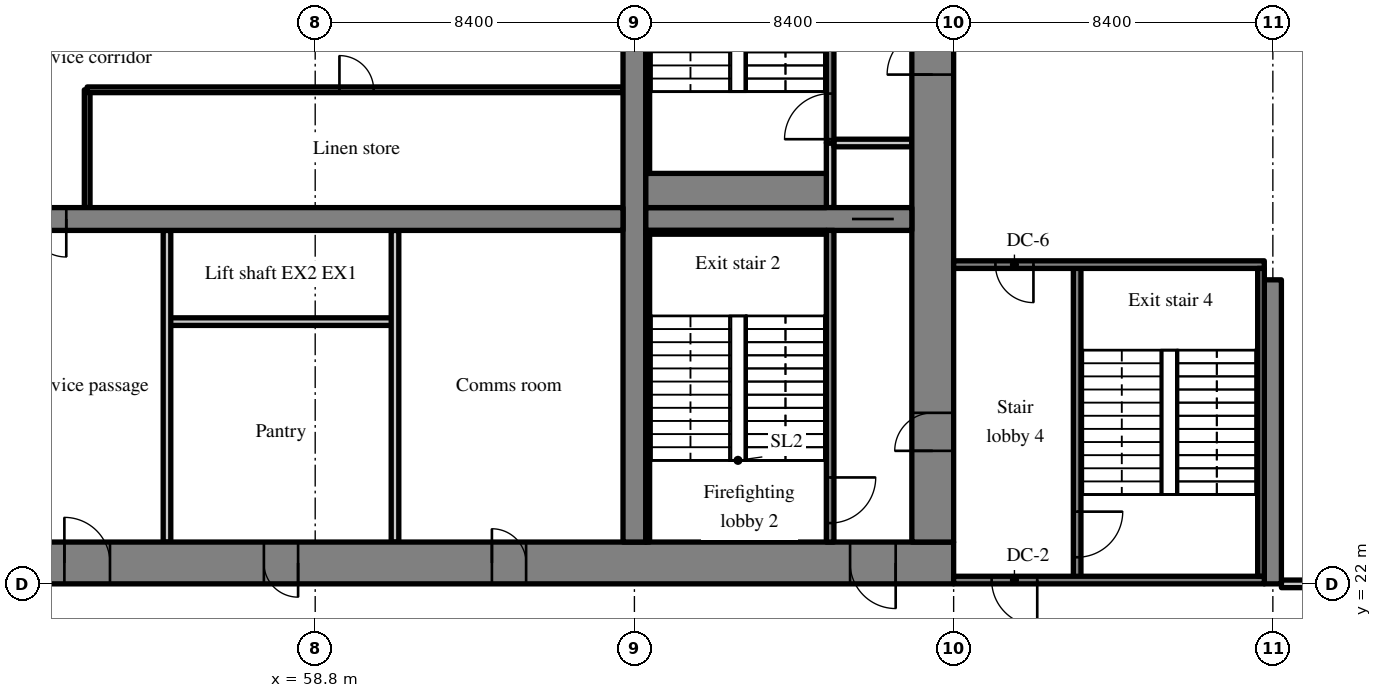
"""IFC4 building model, lengths in metres.
Left out: names, types, materials, properties, quantities, classifications, styles, units other than length and angle.
Written with IfcOpenShell. Run it as: python <this file> out.ifc"""

import sys

from ifc_helpers import new_model, si_unit, direction, frame, frame_2d, origin, place, context, subcontext, project, spatial, rectangle, extrude, source, transform, mapped, element, fill, save


model = new_model("IFC4")
c1 = context("Model", 3, precision=1e-05, world=origin(), true_north=direction((0.0, 1.0)))
c2 = subcontext(c1, "Body", "Model", "MODEL_VIEW")
j1 = project(units=[si_unit("LENGTHUNIT", "METRE"), si_unit("PLANEANGLEUNIT", "RADIAN")], contexts=[c1])
p1 = place(None, origin())
s1 = spatial("IfcSite", under=j1, at=p1, CompositionType="ELEMENT")
p2 = place(p1, origin())
s2 = spatial("IfcBuilding", under=s1, at=p2, CompositionType="ELEMENT")
p3 = place(p2, frame((0.0, 0.0, 27.8)))
s3 = spatial("IfcBuildingStorey", under=s2, at=p3, CompositionType="ELEMENT", Elevation=27.8)
m1 = source(origin(), c2, "Body", "SweptSolid", [
    extrude(rectangle(XDim=50.4, YDim=1.1, at=frame_2d((25.2, 0.0))), origin(), (0.0, 0.0, 1.0), 3.52),
])
p4 = place(p3, frame((25.2, 22.55, 0.0), z_axis=(0.0, 0.0, 1.0), x_axis=(1.0, 0.0, 0.0)))
e1 = element("IfcWall", 1, at=p4, inside=s3, PredefinedType="SHEAR", context=c2, shape_type="MappedRepresentation", body=[
    mapped(m1, transform((0.0, 0.0, 0.0), scale=1.0)),
])
m2 = source(origin(), c2, "Body", "SweptSolid", [
    extrude(rectangle(XDim=1.8, YDim=2.1, at=frame_2d((0.9, 1.05))), frame((0.0, 0.56, 0.0), z_axis=(0.0, -1.0, 0.0), x_axis=(1.0, 0.0, 0.0)), (0.0, 0.0, 1.0), 1.12),
])
p5 = place(p4, frame((15.9, 0.0, 0.0)))
e2 = element("IfcOpeningElement", 2, at=p5, cuts=e1, PredefinedType="OPENING", context=c2, shape_type="MappedRepresentation", body=[
    mapped(m2, transform((0.0, 0.0, 0.0), scale=1.0)),
])
m3 = source(origin(), c2, "Body", "SweptSolid", [
    extrude(rectangle(XDim=1.2, YDim=2.1, at=frame_2d((0.6, 1.05))), frame((0.0, 0.56, 0.0), z_axis=(0.0, -1.0, 0.0), x_axis=(1.0, 0.0, 0.0)), (0.0, 0.0, 1.0), 1.12),
])
p6 = place(p4, frame((27.0, 0.0, 0.0)))
e3 = element("IfcOpeningElement", 3, at=p6, cuts=e1, PredefinedType="OPENING", context=c2, shape_type="MappedRepresentation", body=[
    mapped(m3, transform((0.0, 0.0, 0.0), scale=1.0)),
])
m4 = source(origin(), c2, "Body", "SweptSolid", [
    extrude(rectangle(XDim=0.9, YDim=2.1, at=frame_2d((0.45, 1.05))), frame((0.0, 0.56, 0.0), z_axis=(0.0, -1.0, 0.0), x_axis=(1.0, 0.0, 0.0)), (0.0, 0.0, 1.0), 1.12),
])
p7 = place(p4, frame((32.25, 0.0, 0.0)))
e4 = element("IfcOpeningElement", 4, at=p7, cuts=e1, PredefinedType="OPENING", context=c2, shape_type="MappedRepresentation", body=[
    mapped(m4, transform((0.0, 0.0, 0.0), scale=1.0)),
])
p8 = place(p4, frame((38.25, 0.0, 0.0)))
e5 = element("IfcOpeningElement", 5, at=p8, cuts=e1, PredefinedType="OPENING", context=c2, shape_type="MappedRepresentation", body=[
    mapped(m4, transform((0.0, 0.0, 0.0), scale=1.0)),
])
p9 = place(p4, frame((6.425, 0.0, 0.0)))
e6 = element("IfcOpeningElement", 6, at=p9, cuts=e1, PredefinedType="OPENING", context=c2, shape_type="MappedRepresentation", body=[
    mapped(m3, transform((0.0, 0.0, 0.0), scale=1.0)),
])
p10 = place(p4, frame((47.675, 0.0, 0.0)))
e7 = element("IfcOpeningElement", 7, at=p10, cuts=e1, PredefinedType="OPENING", context=c2, shape_type="MappedRepresentation", body=[
    mapped(m3, transform((0.0, 0.0, 0.0), scale=1.0)),
])
m5 = source(origin(), c2, "Body", "SweptSolid", [
    extrude(rectangle(XDim=17.8, YDim=1.1, at=frame_2d((8.9, 0.0))), origin(), (0.0, 0.0, 1.0), 3.52),
])
p11 = place(p3, frame((75.05, 23.1, 0.0), z_axis=(0.0, 0.0, 1.0), x_axis=(0.0, 1.0, 0.0)))
e8 = element("IfcWall", 8, at=p11, inside=s3, PredefinedType="SHEAR", context=c2, shape_type="MappedRepresentation", body=[
    mapped(m5, transform((0.0, 0.0, 0.0), scale=1.0)),
])
m6 = source(origin(), c2, "Body", "SweptSolid", [
    extrude(rectangle(XDim=1.0, YDim=2.1, at=frame_2d((0.5, 1.05))), frame((0.0, 0.56, 0.0), z_axis=(0.0, -1.0, 0.0), x_axis=(1.0, 0.0, 0.0)), (0.0, 0.0, 1.0), 1.12),
])
p12 = place(p11, frame((2.4, 0.0, 0.0)))
e9 = element("IfcOpeningElement", 9, at=p12, cuts=e8, PredefinedType="OPENING", context=c2, shape_type="MappedRepresentation", body=[
    mapped(m6, transform((0.0, 0.0, 0.0), scale=1.0)),
])
p13 = place(p11, frame((12.3, 0.0, 0.0)))
e10 = element("IfcOpeningElement", 10, at=p13, cuts=e8, PredefinedType="OPENING", context=c2, shape_type="MappedRepresentation", body=[
    mapped(m3, transform((0.0, 0.0, 0.0), scale=1.0)),
])
m7 = source(origin(), c2, "Body", "SweptSolid", [
    extrude(rectangle(XDim=17.8, YDim=0.6, at=frame_2d((8.9, 0.0))), origin(), (0.0, 0.0, 1.0), 3.52),
])
p14 = place(p3, frame((67.2, 23.1, 0.0), z_axis=(0.0, 0.0, 1.0), x_axis=(0.0, 1.0, 0.0)))
e11 = element("IfcWall", 11, at=p14, inside=s3, PredefinedType="SHEAR", context=c2, shape_type="MappedRepresentation", body=[
    mapped(m7, transform((0.0, 0.0, 0.0), scale=1.0)),
])
m8 = source(origin(), c2, "Body", "SweptSolid", [
    extrude(rectangle(XDim=16.2, YDim=0.6, at=frame_2d((8.1, 0.0))), origin(), (0.0, 0.0, 1.0), 3.52),
])
p15 = place(p3, frame((50.7, 31.6, 0.0), z_axis=(0.0, 0.0, 1.0), x_axis=(1.0, 0.0, 0.0)))
e12 = element("IfcWall", 12, at=p15, inside=s3, PredefinedType="SHEAR", context=c2, shape_type="MappedRepresentation", body=[
    mapped(m8, transform((0.0, 0.0, 0.0), scale=1.0)),
])
m9 = source(origin(), c2, "Body", "SweptSolid", [
    extrude(rectangle(XDim=1.0, YDim=2.1, at=frame_2d((0.5, 1.05))), frame((0.0, 0.31, 0.0), z_axis=(0.0, -1.0, 0.0), x_axis=(1.0, 0.0, 0.0)), (0.0, 0.0, 1.0), 0.62),
])
p16 = place(p15, frame((0.55, 0.0, 0.0)))
e13 = element("IfcOpeningElement", 13, at=p16, cuts=e12, PredefinedType="OPENING", context=c2, shape_type="MappedRepresentation", body=[
    mapped(m9, transform((0.0, 0.0, 0.0), scale=1.0)),
])
m10 = source(origin(), c2, "Body", "SweptSolid", [
    extrude(rectangle(XDim=7.0, YDim=0.6, at=frame_2d((3.5, 0.0))), origin(), (0.0, 0.0, 1.0), 3.52),
])
p17 = place(p3, frame((67.5, 31.6, 0.0), z_axis=(0.0, 0.0, 1.0), x_axis=(1.0, 0.0, 0.0)))
e14 = element("IfcWall", 14, at=p17, inside=s3, PredefinedType="SHEAR", context=c2, shape_type="MappedRepresentation", body=[
    mapped(m10, transform((0.0, 0.0, 0.0), scale=1.0)),
])
m11 = source(origin(), c2, "Body", "SweptSolid", [
    extrude(rectangle(XDim=1.1, YDim=2.1, at=frame_2d((0.55, 1.05))), frame((0.0, 0.31, 0.0), z_axis=(0.0, -1.0, 0.0), x_axis=(1.0, 0.0, 0.0)), (0.0, 0.0, 1.0), 0.62),
])
p18 = place(p17, frame((5.425, 0.0, 0.0)))
e15 = element("IfcOpeningElement", 15, at=p18, cuts=e14, PredefinedType="OPENING", context=c2, shape_type="MappedRepresentation", body=[
    mapped(m11, transform((0.0, 0.0, 0.0), scale=1.0)),
])
m12 = source(origin(), c2, "Body", "SweptSolid", [
    extrude(rectangle(XDim=8.0, YDim=0.45, at=frame_2d((4.0, 0.0))), origin(), (0.0, 0.0, 1.0), 3.52),
])
p19 = place(p3, frame((84.0, 22.0, 0.0), z_axis=(0.0, 0.0, 1.0), x_axis=(0.0, 1.0, 0.0)))
e16 = element("IfcWall", 16, at=p19, inside=s3, PredefinedType="SHEAR", context=c2, shape_type="MappedRepresentation", body=[
    mapped(m12, transform((0.0, 0.0, 0.0), scale=1.0)),
])
m13 = source(origin(), c2, "Body", "SweptSolid", [
    extrude(rectangle(XDim=6.0, YDim=0.2, at=frame_2d((3.0, 0.0))), origin(), (0.0, 0.0, 1.0), 3.52),
])
p20 = place(p3, frame((60.9, 28.9, 0.0), z_axis=(0.0, 0.0, 1.0), x_axis=(-1.0, 0.0, 0.0)))
e17 = element("IfcWall", 17, at=p20, inside=s3, PredefinedType="SOLIDWALL", context=c2, shape_type="MappedRepresentation", body=[
    mapped(m13, transform((0.0, 0.0, 0.0), scale=1.0)),
])
m14 = source(origin(), c2, "Body", "SweptSolid", [
    extrude(rectangle(XDim=8.2, YDim=0.2, at=frame_2d((4.1, 0.0))), origin(), (0.0, 0.0, 1.0), 3.52),
])
for number, where, z_axis, x_axis in (
    (18, (54.9, 23.1, 0.0), (0.0, 0.0, 1.0), (0.0, 1.0, 0.0)),
    (19, (60.9, 23.1, 0.0), (0.0, 0.0, 1.0), (0.0, 1.0, 0.0)),
):
    element("IfcWall", number, at=place(p3, frame(where, z_axis=z_axis, x_axis=x_axis)), inside=s3, PredefinedType="PARTITIONING", context=c2, shape_type="MappedRepresentation", body=[
        mapped(m14, transform((0.0, 0.0, 0.0), scale=1.0)),
    ])
m15 = source(origin(), c2, "Body", "SweptSolid", [
    extrude(rectangle(XDim=3.1, YDim=0.15, at=frame_2d((1.55, 0.0))), origin(), (0.0, 0.0, 1.0), 3.52),
])
p21 = place(p3, frame((52.8, 31.9, 0.0), z_axis=(0.0, 0.0, 1.0), x_axis=(0.0, 1.0, 0.0)))
e20 = element("IfcWall", 20, at=p21, inside=s3, PredefinedType="PARTITIONING", context=c2, shape_type="MappedRepresentation", body=[
    mapped(m15, transform((0.0, 0.0, 0.0), scale=1.0)),
])
m16 = source(origin(), c2, "Body", "SweptSolid", [
    extrude(rectangle(XDim=14.1, YDim=0.15, at=frame_2d((7.05, 0.0))), origin(), (0.0, 0.0, 1.0), 3.52),
])
p22 = place(p3, frame((66.9, 35.0, 0.0), z_axis=(0.0, 0.0, 1.0), x_axis=(-1.0, 0.0, 0.0)))
e21 = element("IfcWall", 21, at=p22, inside=s3, PredefinedType="PARTITIONING", context=c2, shape_type="MappedRepresentation", body=[
    mapped(m16, transform((0.0, 0.0, 0.0), scale=1.0)),
])
m17 = source(origin(), c2, "Body", "SweptSolid", [
    extrude(rectangle(XDim=0.9, YDim=2.1, at=frame_2d((0.45, 1.05))), frame((0.0, 0.085, 0.0), z_axis=(0.0, -1.0, 0.0), x_axis=(1.0, 0.0, 0.0)), (0.0, 0.0, 1.0), 0.17),
])
p23 = place(p22, frame((6.562, 0.0, 0.0)))
e22 = element("IfcOpeningElement", 22, at=p23, cuts=e21, PredefinedType="OPENING", context=c2, shape_type="MappedRepresentation", body=[
    mapped(m17, transform((0.0, 0.0, 0.0), scale=1.0)),
])
m18 = source(origin(), c2, "Body", "SweptSolid", [
    extrude(rectangle(XDim=8.2, YDim=0.2, at=frame_2d((4.1, 0.0))), origin(), (0.0, 0.0, 1.0), 3.52),
])
p24 = place(p3, frame((72.35, 23.1, 0.0), z_axis=(0.0, 0.0, 1.0), x_axis=(0.0, 1.0, 0.0)))
e23 = element("IfcWall", 23, at=p24, inside=s3, PredefinedType="SOLIDWALL", context=c2, shape_type="MappedRepresentation", body=[
    mapped(m18, transform((0.0, 0.0, 0.0), scale=1.0)),
])
m19 = source(origin(), c2, "Body", "SweptSolid", [
    extrude(rectangle(XDim=1.2, YDim=2.1, at=frame_2d((0.6, 1.05))), frame((0.0, 0.11, 0.0), z_axis=(0.0, -1.0, 0.0), x_axis=(1.0, 0.0, 0.0)), (0.0, 0.0, 1.0), 0.22),
])
p25 = place(p24, frame((0.5, 0.0, 0.0)))
e24 = element("IfcOpeningElement", 24, at=p25, cuts=e23, PredefinedType="OPENING", context=c2, shape_type="MappedRepresentation", body=[
    mapped(m19, transform((0.0, 0.0, 0.0), scale=1.0)),
])
m20 = source(origin(), c2, "Body", "SweptSolid", [
    extrude(rectangle(XDim=1.7, YDim=0.2, at=frame_2d((0.85, 0.0))), origin(), (0.0, 0.0, 1.0), 3.52),
])
p26 = place(p3, frame((72.35, 31.9, 0.0), z_axis=(0.0, 0.0, 1.0), x_axis=(0.0, 1.0, 0.0)))
e25 = element("IfcWall", 25, at=p26, inside=s3, PredefinedType="SOLIDWALL", context=c2, shape_type="MappedRepresentation", body=[
    mapped(m20, transform((0.0, 0.0, 0.0), scale=1.0)),
])
m21 = source(origin(), c2, "Body", "SweptSolid", [
    extrude(rectangle(XDim=2.05, YDim=0.2, at=frame_2d((1.025, 0.0))), origin(), (0.0, 0.0, 1.0), 3.52),
])
p27 = place(p3, frame((72.45, 33.6, 0.0), z_axis=(0.0, 0.0, 1.0), x_axis=(1.0, 0.0, 0.0)))
e26 = element("IfcWall", 26, at=p27, inside=s3, PredefinedType="SOLIDWALL", context=c2, shape_type="MappedRepresentation", body=[
    mapped(m21, transform((0.0, 0.0, 0.0), scale=1.0)),
])
m22 = source(origin(), c2, "Body", "SweptSolid", [
    extrude(rectangle(XDim=7.3, YDim=0.2, at=frame_2d((3.65, 0.0))), origin(), (0.0, 0.0, 1.0), 3.52),
])
p28 = place(p3, frame((72.35, 33.6, 0.0), z_axis=(0.0, 0.0, 1.0), x_axis=(0.0, 1.0, 0.0)))
e27 = element("IfcWall", 27, at=p28, inside=s3, PredefinedType="SOLIDWALL", context=c2, shape_type="MappedRepresentation", body=[
    mapped(m22, transform((0.0, 0.0, 0.0), scale=1.0)),
])
p29 = place(p28, frame((0.1, 0.0, 0.0)))
e28 = element("IfcOpeningElement", 28, at=p29, cuts=e27, PredefinedType="OPENING", context=c2, shape_type="MappedRepresentation", body=[
    mapped(m19, transform((0.0, 0.0, 0.0), scale=1.0)),
])
m23 = source(origin(), c2, "Body", "SweptSolid", [
    extrude(rectangle(XDim=8.3, YDim=0.2, at=frame_2d((4.15, 0.0))), origin(), (0.0, 0.0, 1.0), 3.52),
])
p30 = place(p3, frame((78.85, 22.1, 0.0), z_axis=(0.0, 0.0, 1.0), x_axis=(0.0, 1.0, 0.0)))
e29 = element("IfcWall", 29, at=p30, inside=s3, PredefinedType="SOLIDWALL", context=c2, shape_type="MappedRepresentation", body=[
    mapped(m23, transform((0.0, 0.0, 0.0), scale=1.0)),
])
p31 = place(p30, frame((0.6, 0.0, 0.0)))
e30 = element("IfcOpeningElement", 30, at=p31, cuts=e29, PredefinedType="OPENING", context=c2, shape_type="MappedRepresentation", body=[
    mapped(m19, transform((0.0, 0.0, 0.0), scale=1.0)),
])
m24 = source(origin(), c2, "Body", "SweptSolid", [
    extrude(rectangle(XDim=8.175, YDim=0.2, at=frame_2d((4.087, 0.0))), origin(), (0.0, 0.0, 1.0), 3.52),
])
p32 = place(p3, frame((83.775, 22.1, 0.0), z_axis=(0.0, 0.0, 1.0), x_axis=(-1.0, 0.0, 0.0)))
e31 = element("IfcWall", 31, at=p32, inside=s3, PredefinedType="SOLIDWALL", context=c2, shape_type="MappedRepresentation", body=[
    mapped(m24, transform((0.0, 0.0, 0.0), scale=1.0)),
])
p33 = place(p32, frame((5.975, 0.0, 0.0)))
e32 = element("IfcOpeningElement", 32, at=p33, cuts=e31, PredefinedType="OPENING", context=c2, shape_type="MappedRepresentation", body=[
    mapped(m19, transform((0.0, 0.0, 0.0), scale=1.0)),
])
p34 = place(p3, frame((83.775, 30.4, 0.0), z_axis=(0.0, 0.0, 1.0), x_axis=(-1.0, 0.0, 0.0)))
e33 = element("IfcWall", 33, at=p34, inside=s3, PredefinedType="SOLIDWALL", context=c2, shape_type="MappedRepresentation", body=[
    mapped(m24, transform((0.0, 0.0, 0.0), scale=1.0)),
])
m25 = source(origin(), c2, "Body", "SweptSolid", [
    extrude(rectangle(XDim=1.0, YDim=2.1, at=frame_2d((0.5, 1.05))), frame((0.0, 0.11, 0.0), z_axis=(0.0, -1.0, 0.0), x_axis=(1.0, 0.0, 0.0)), (0.0, 0.0, 1.0), 0.22),
])
p35 = place(p34, frame((6.075, 0.0, 0.0)))
e34 = element("IfcOpeningElement", 34, at=p35, cuts=e33, PredefinedType="OPENING", context=c2, shape_type="MappedRepresentation", body=[
    mapped(m25, transform((0.0, 0.0, 0.0), scale=1.0)),
])
m26 = source(origin(), c2, "Body", "SweptSolid", [
    extrude(rectangle(XDim=4.75, YDim=0.1, at=frame_2d((2.375, 0.0))), origin(), (0.0, 0.0, 1.0), 3.52),
])
p36 = place(p3, frame((67.5, 31.25, 0.0), z_axis=(0.0, 0.0, 1.0), x_axis=(1.0, 0.0, 0.0)))
e35 = element("IfcWall", 35, at=p36, inside=s3, PredefinedType="SOLIDWALL", context=c2, shape_type="MappedRepresentation", body=[
    mapped(m26, transform((0.0, 0.0, 0.0), scale=1.0)),
])
m27 = source(origin(), c2, "Body", "SweptSolid", [
    extrude(rectangle(XDim=8.1, YDim=0.1, at=frame_2d((4.05, 0.0))), origin(), (0.0, 0.0, 1.0), 3.52),
])
p37 = place(p3, frame((67.55, 23.1, 0.0), z_axis=(0.0, 0.0, 1.0), x_axis=(0.0, 1.0, 0.0)))
e36 = element("IfcWall", 36, at=p37, inside=s3, PredefinedType="SOLIDWALL", context=c2, shape_type="MappedRepresentation", body=[
    mapped(m27, transform((0.0, 0.0, 0.0), scale=1.0)),
])
m28 = source(origin(), c2, "Body", "SweptSolid", [
    extrude(rectangle(XDim=4.75, YDim=0.9, at=frame_2d((2.375, 0.0))), origin(), (0.0, 0.0, 1.0), 3.52),
])
p38 = place(p3, frame((67.5, 32.35, 0.0), z_axis=(0.0, 0.0, 1.0), x_axis=(1.0, 0.0, 0.0)))
e37 = element("IfcWall", 37, at=p38, inside=s3, PredefinedType="SOLIDWALL", context=c2, shape_type="MappedRepresentation", body=[
    mapped(m28, transform((0.0, 0.0, 0.0), scale=1.0)),
])
p39 = place(p3, frame((67.55, 32.8, 0.0), z_axis=(0.0, 0.0, 1.0), x_axis=(0.0, 1.0, 0.0)))
e38 = element("IfcWall", 38, at=p39, inside=s3, PredefinedType="SOLIDWALL", context=c2, shape_type="MappedRepresentation", body=[
    mapped(m27, transform((0.0, 0.0, 0.0), scale=1.0)),
])
m29 = source(origin(), c2, "Body", "SweptSolid", [
    extrude(rectangle(XDim=8.1, YDim=0.175, at=frame_2d((4.05, 0.0))), origin(), (0.0, 0.0, 1.0), 3.52),
])
p40 = place(p3, frame((83.688, 22.2, 0.0), z_axis=(0.0, 0.0, 1.0), x_axis=(0.0, 1.0, 0.0)))
e39 = element("IfcWall", 39, at=p40, inside=s3, PredefinedType="SOLIDWALL", context=c2, shape_type="MappedRepresentation", body=[
    mapped(m29, transform((0.0, 0.0, 0.0), scale=1.0)),
])
m30 = source(origin(), c2, "Body", "SweptSolid", [
    extrude(rectangle(XDim=7.95, YDim=0.2, at=frame_2d((3.975, 0.0))), origin(), (0.0, 0.0, 1.0), 2.82),
])
p41 = place(p3, frame((84.225, 22.0, 0.0), z_axis=(0.0, 0.0, 1.0), x_axis=(1.0, 0.0, 0.0)))
e40 = element("IfcWall", 40, at=p41, inside=s3, PredefinedType="PARTITIONING", context=c2, shape_type="MappedRepresentation", body=[
    mapped(m30, transform((0.0, 0.0, 0.0), scale=1.0)),
])
m31 = source(origin(), c2, "Body", "SweptSolid", [
    extrude(rectangle(XDim=1.2, YDim=2.1, at=frame_2d((0.6, 1.05))), frame((0.0, 0.325, 0.0), z_axis=(0.0, -1.0, 0.0), x_axis=(1.0, 0.0, 0.0)), (0.0, 0.0, 1.0), 0.05),
])
p42 = place(p6, origin())
e41 = element("IfcDoor", 41, at=p42, inside=s3, OperationType="SINGLE_SWING_LEFT", PredefinedType="DOOR", context=c2, shape_type="MappedRepresentation", body=[
    mapped(m31, transform((0.0, 0.0, 0.0), scale=1.0)),
])
fill(e3, e41)
m32 = source(origin(), c2, "Body", "SweptSolid", [
    extrude(rectangle(XDim=1.0, YDim=2.1, at=frame_2d((0.5, 1.05))), frame((0.0, 0.025, 0.0), z_axis=(0.0, -1.0, 0.0), x_axis=(1.0, 0.0, 0.0)), (0.0, 0.0, 1.0), 0.05),
])
p43 = place(p16, origin())
e42 = element("IfcDoor", 42, at=p43, inside=s3, OperationType="SINGLE_SWING_RIGHT", PredefinedType="DOOR", context=c2, shape_type="MappedRepresentation", body=[
    mapped(m32, transform((0.0, 0.0, 0.0), scale=1.0)),
])
fill(e13, e42)
m33 = source(origin(), c2, "Body", "SweptSolid", [
    extrude(rectangle(XDim=0.9, YDim=2.1, at=frame_2d((0.45, 1.05))), frame((0.0, 0.325, 0.0), z_axis=(0.0, -1.0, 0.0), x_axis=(1.0, 0.0, 0.0)), (0.0, 0.0, 1.0), 0.05),
])
p44 = place(p7, origin())
e43 = element("IfcDoor", 43, at=p44, inside=s3, OperationType="SINGLE_SWING_RIGHT", PredefinedType="DOOR", context=c2, shape_type="MappedRepresentation", body=[
    mapped(m33, transform((0.0, 0.0, 0.0), scale=1.0)),
])
fill(e4, e43)
p45 = place(p8, origin())
e44 = element("IfcDoor", 44, at=p45, inside=s3, OperationType="SINGLE_SWING_LEFT", PredefinedType="DOOR", context=c2, shape_type="MappedRepresentation", body=[
    mapped(m33, transform((0.0, 0.0, 0.0), scale=1.0)),
])
fill(e5, e44)
m34 = source(origin(), c2, "Body", "SweptSolid", [
    extrude(rectangle(XDim=0.9, YDim=2.1, at=frame_2d((0.45, 1.05))), frame((0.0, 0.025, 0.0), z_axis=(0.0, -1.0, 0.0), x_axis=(1.0, 0.0, 0.0)), (0.0, 0.0, 1.0), 0.05),
])
p46 = place(p23, origin())
e45 = element("IfcDoor", 45, at=p46, inside=s3, OperationType="SINGLE_SWING_RIGHT", PredefinedType="DOOR", context=c2, shape_type="MappedRepresentation", body=[
    mapped(m34, transform((0.0, 0.0, 0.0), scale=1.0)),
])
fill(e22, e45)
m35 = source(origin(), c2, "Body", "SweptSolid", [
    extrude(rectangle(XDim=1.2, YDim=2.1, at=frame_2d((0.6, 1.05))), frame((0.0, 0.025, 0.0), z_axis=(0.0, -1.0, 0.0), x_axis=(1.0, 0.0, 0.0)), (0.0, 0.0, 1.0), 0.05),
])
p47 = place(p25, origin())
e46 = element("IfcDoor", 46, at=p47, inside=s3, OperationType="SINGLE_SWING_RIGHT", PredefinedType="DOOR", context=c2, shape_type="MappedRepresentation", body=[
    mapped(m35, transform((0.0, 0.0, 0.0), scale=1.0)),
])
fill(e24, e46)
p48 = place(p10, origin())
e47 = element("IfcDoor", 47, at=p48, inside=s3, OperationType="SINGLE_SWING_RIGHT", PredefinedType="DOOR", context=c2, shape_type="MappedRepresentation", body=[
    mapped(m31, transform((0.0, 0.0, 0.0), scale=1.0)),
])
fill(e7, e47)
m36 = source(origin(), c2, "Body", "SweptSolid", [
    extrude(rectangle(XDim=1.1, YDim=2.1, at=frame_2d((0.55, 1.05))), frame((0.0, 0.025, 0.0), z_axis=(0.0, -1.0, 0.0), x_axis=(1.0, 0.0, 0.0)), (0.0, 0.0, 1.0), 0.05),
])
p49 = place(p18, origin())
e48 = element("IfcDoor", 48, at=p49, inside=s3, OperationType="SLIDING_TO_RIGHT", PredefinedType="DOOR", context=c2, shape_type="MappedRepresentation", body=[
    mapped(m36, transform((0.0, 0.0, 0.0), scale=1.0)),
])
fill(e15, e48)
p50 = place(p12, origin())
e49 = element("IfcDoor", 49, at=p50, inside=s3, OperationType="SINGLE_SWING_LEFT", PredefinedType="DOOR", context=c2, shape_type="MappedRepresentation", body=[
    mapped(m32, transform((0.0, 0.0, 0.0), scale=1.0)),
])
fill(e9, e49)
p51 = place(p29, origin())
e50 = element("IfcDoor", 50, at=p51, inside=s3, OperationType="SINGLE_SWING_LEFT", PredefinedType="DOOR", context=c2, shape_type="MappedRepresentation", body=[
    mapped(m35, transform((0.0, 0.0, 0.0), scale=1.0)),
])
fill(e28, e50)
p52 = place(p13, origin())
e51 = element("IfcDoor", 51, at=p52, inside=s3, OperationType="SINGLE_SWING_LEFT", PredefinedType="DOOR", context=c2, shape_type="MappedRepresentation", body=[
    mapped(m35, transform((0.0, 0.0, 0.0), scale=1.0)),
])
fill(e10, e51)
p53 = place(p31, origin())
e52 = element("IfcDoor", 52, at=p53, inside=s3, OperationType="SINGLE_SWING_RIGHT", PredefinedType="DOOR", context=c2, shape_type="MappedRepresentation", body=[
    mapped(m35, transform((0.0, 0.0, 0.0), scale=1.0)),
])
fill(e30, e52)
p54 = place(p33, origin())
e53 = element("IfcDoor", 53, at=p54, inside=s3, OperationType="SINGLE_SWING_LEFT", PredefinedType="DOOR", context=c2, shape_type="MappedRepresentation", body=[
    mapped(m35, transform((0.0, 0.0, 0.0), scale=1.0)),
])
fill(e32, e53)
p55 = place(p35, origin())
e54 = element("IfcDoor", 54, at=p55, inside=s3, OperationType="SINGLE_SWING_LEFT", PredefinedType="DOOR", context=c2, shape_type="MappedRepresentation", body=[
    mapped(m32, transform((0.0, 0.0, 0.0), scale=1.0)),
])
fill(e34, e54)
save(model, sys.argv[1])
